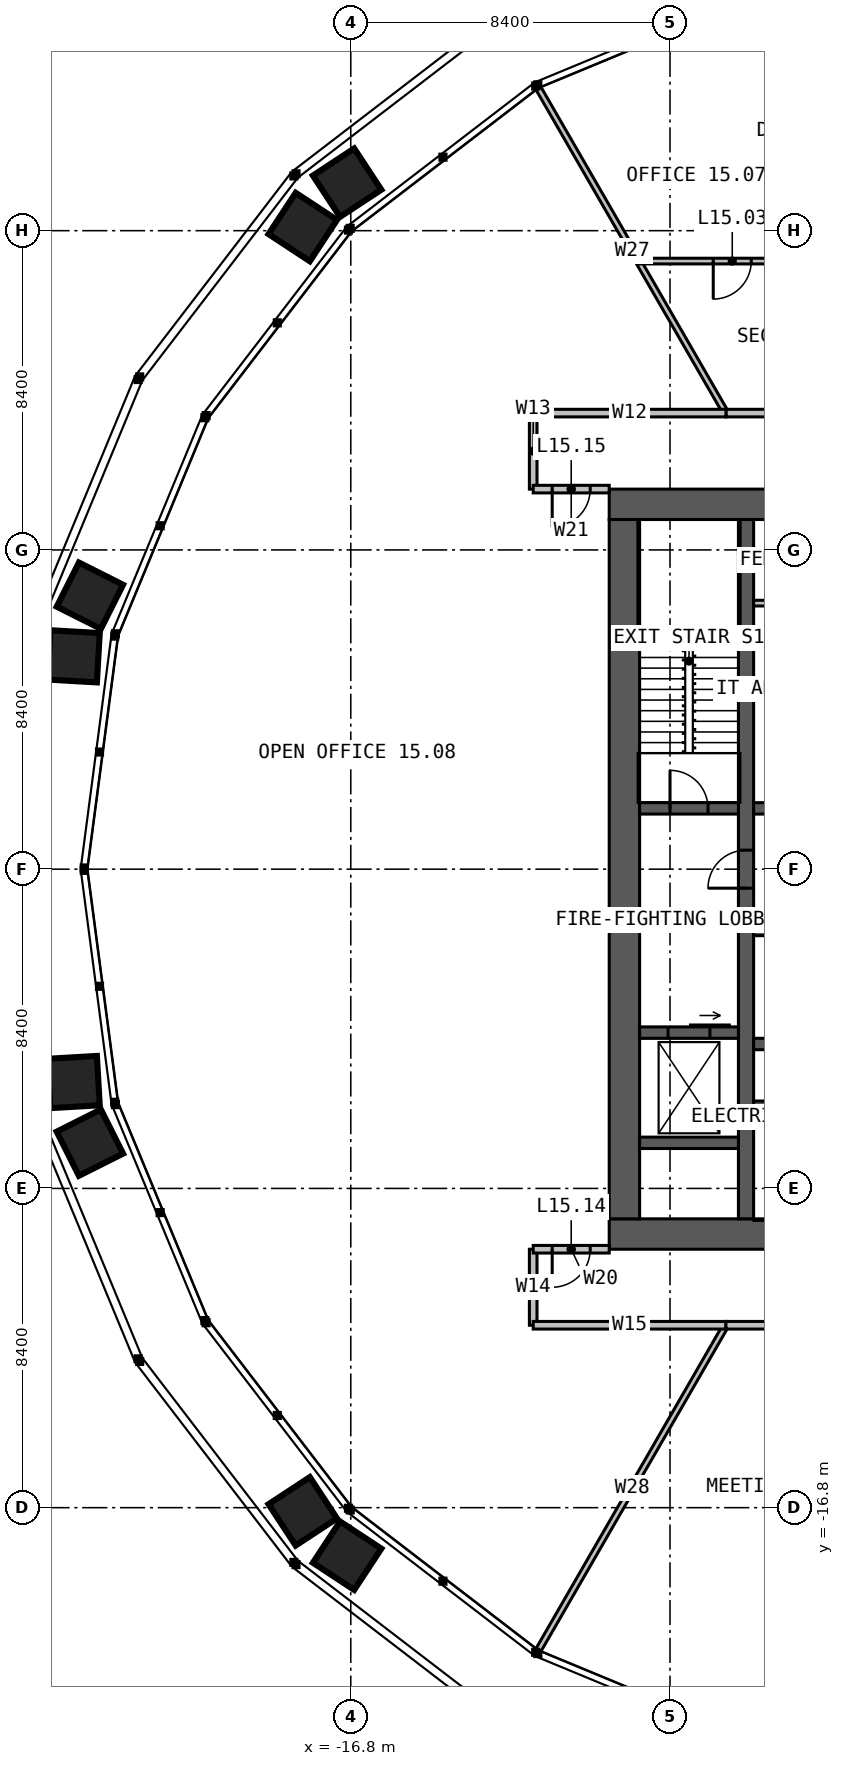
"""IFC4 building model, lengths in metres.
Left out: names, types, materials, properties, quantities, classifications, styles, units other than length and angle.
Written with IfcOpenShell. Run it as: python <this file> out.ifc"""

import sys

from ifc_helpers import new_model, si_unit, direction, frame, frame_2d, origin, place, context, subcontext, project, spatial, rectangle, extrude, element, fill, save


model = new_model("IFC4")
c1 = context("Model", 3, precision=1e-05, world=origin(), true_north=direction((0.0, 1.0)))
c2 = subcontext(c1, "Body", "Model", "MODEL_VIEW")
j1 = project(units=[si_unit("LENGTHUNIT", "METRE"), si_unit("PLANEANGLEUNIT", "RADIAN")], contexts=[c1])
p1 = place(None, origin())
s1 = spatial("IfcSite", under=j1, at=p1, CompositionType="ELEMENT")
p2 = place(p1, origin())
s2 = spatial("IfcBuilding", under=s1, at=p2, CompositionType="ELEMENT")
p3 = place(p2, frame((0.0, 0.0, 65.0)))
s3 = spatial("IfcBuildingStorey", under=s2, at=p3, CompositionType="ELEMENT", Elevation=65.0)
p4 = place(p3, frame((-10.0, 9.6, 0.0), z_axis=(0.0, 0.0, 1.0), x_axis=(1.0, 0.0, 0.0)))
e1 = element("IfcWall", 1, at=p4, inside=s3, PredefinedType="SOLIDWALL", context=c2, shape_type="SweptSolid", body=[
    extrude(rectangle(XDim=20.0, YDim=0.8, at=frame_2d((10.0, 0.0))), origin(), (0.0, 0.0, 1.0), 4.0),
])
p5 = place(p4, frame((9.4, 0.0, 0.0)))
e2 = element("IfcOpeningElement", 2, at=p5, cuts=e1, PredefinedType="OPENING", context=c2, shape_type="SweptSolid", body=[
    extrude(rectangle(XDim=1.2, YDim=2.2, at=frame_2d((0.6, 1.1))), frame((0.0, 0.41, 0.0), z_axis=(0.0, -1.0, 0.0), x_axis=(1.0, 0.0, 0.0)), (0.0, 0.0, 1.0), 0.82),
])
p6 = place(p3, frame((10.0, -9.6, 0.0), z_axis=(0.0, 0.0, 1.0), x_axis=(-1.0, 0.0, 0.0)))
e3 = element("IfcWall", 3, at=p6, inside=s3, PredefinedType="SOLIDWALL", context=c2, shape_type="SweptSolid", body=[
    extrude(rectangle(XDim=20.0, YDim=0.8, at=frame_2d((10.0, 0.0))), origin(), (0.0, 0.0, 1.0), 4.0),
])
p7 = place(p6, frame((6.875, 0.0, 0.0)))
e4 = element("IfcOpeningElement", 4, at=p7, cuts=e3, PredefinedType="OPENING", context=c2, shape_type="SweptSolid", body=[
    extrude(rectangle(XDim=1.2, YDim=2.2, at=frame_2d((0.6, 1.1))), frame((0.0, 0.41, 0.0), z_axis=(0.0, -1.0, 0.0), x_axis=(1.0, 0.0, 0.0)), (0.0, 0.0, 1.0), 0.82),
])
p8 = place(p3, frame((-9.6, 9.2, 0.0), z_axis=(0.0, 0.0, 1.0), x_axis=(0.0, -1.0, 0.0)))
e5 = element("IfcWall", 5, at=p8, inside=s3, PredefinedType="SOLIDWALL", context=c2, shape_type="SweptSolid", body=[
    extrude(rectangle(XDim=18.4, YDim=0.8, at=frame_2d((9.2, 0.0))), origin(), (0.0, 0.0, 1.0), 4.0),
])
p9 = place(p3, frame((-6.4, -9.2, 0.0), z_axis=(0.0, 0.0, 1.0), x_axis=(0.0, 1.0, 0.0)))
e6 = element("IfcWall", 6, at=p9, inside=s3, PredefinedType="SOLIDWALL", context=c2, shape_type="SweptSolid", body=[
    extrude(rectangle(XDim=18.4, YDim=0.4, at=frame_2d((9.2, 0.0))), origin(), (0.0, 0.0, 1.0), 4.0),
])
p10 = place(p9, frame((8.7, 0.0, 0.0)))
e7 = element("IfcOpeningElement", 7, at=p10, cuts=e6, PredefinedType="OPENING", context=c2, shape_type="SweptSolid", body=[
    extrude(rectangle(XDim=1.0, YDim=2.2, at=frame_2d((0.5, 1.1))), frame((0.0, 0.21, 0.0), z_axis=(0.0, -1.0, 0.0), x_axis=(1.0, 0.0, 0.0)), (0.0, 0.0, 1.0), 0.42),
])
p11 = place(p3, frame((-6.2, 1.6, 0.0), z_axis=(0.0, 0.0, 1.0), x_axis=(1.0, 0.0, 0.0)))
e8 = element("IfcWall", 8, at=p11, inside=s3, PredefinedType="SOLIDWALL", context=c2, shape_type="SweptSolid", body=[
    extrude(rectangle(XDim=4.85, YDim=0.3, at=frame_2d((2.425, 0.0))), origin(), (0.0, 0.0, 1.0), 4.0),
])
p12 = place(p11, frame((0.625, 0.0, 0.0)))
e9 = element("IfcOpeningElement", 9, at=p12, cuts=e8, PredefinedType="OPENING", context=c2, shape_type="SweptSolid", body=[
    extrude(rectangle(XDim=1.1, YDim=2.2, at=frame_2d((0.55, 1.1))), frame((0.0, 0.16, 0.0), z_axis=(0.0, -1.0, 0.0), x_axis=(1.0, 0.0, 0.0)), (0.0, 0.0, 1.0), 0.32),
])
p13 = place(p11, frame((3.15, 0.0, 0.0)))
e10 = element("IfcOpeningElement", 10, at=p13, cuts=e8, PredefinedType="OPENING", context=c2, shape_type="SweptSolid", body=[
    extrude(rectangle(XDim=1.1, YDim=2.2, at=frame_2d((0.55, 1.1))), frame((0.0, 0.16, 0.0), z_axis=(0.0, -1.0, 0.0), x_axis=(1.0, 0.0, 0.0)), (0.0, 0.0, 1.0), 0.32),
])
p14 = place(p3, frame((-6.2, 4.6, 0.0), z_axis=(0.0, 0.0, 1.0), x_axis=(1.0, 0.0, 0.0)))
e11 = element("IfcWall", 11, at=p14, inside=s3, PredefinedType="SOLIDWALL", context=c2, shape_type="SweptSolid", body=[
    extrude(rectangle(XDim=4.85, YDim=0.3, at=frame_2d((2.425, 0.0))), origin(), (0.0, 0.0, 1.0), 4.0),
])
for number, where, z_axis, x_axis in (
    (12, (-6.2, -1.6, 0.0), (0.0, 0.0, 1.0), (1.0, 0.0, 0.0)),
    (13, (-6.2, -4.6, 0.0), (0.0, 0.0, 1.0), (1.0, 0.0, 0.0)),
):
    element("IfcWall", number, at=place(p3, frame(where, z_axis=z_axis, x_axis=x_axis)), inside=s3, PredefinedType="SOLIDWALL", context=c2, shape_type="SweptSolid", body=[
        extrude(rectangle(XDim=7.4, YDim=0.3, at=frame_2d((3.7, 0.0))), origin(), (0.0, 0.0, 1.0), 4.0),
    ])
p15 = place(p3, frame((-6.2, -6.2, 0.0), z_axis=(0.0, 0.0, 1.0), x_axis=(1.0, 0.0, 0.0)))
e14 = element("IfcWall", 14, at=p15, inside=s3, PredefinedType="SOLIDWALL", context=c2, shape_type="SweptSolid", body=[
    extrude(rectangle(XDim=7.4, YDim=0.2, at=frame_2d((3.7, 0.0))), origin(), (0.0, 0.0, 1.0), 4.0),
])
p16 = place(p3, frame((-9.2, 1.6, 0.0), z_axis=(0.0, 0.0, 1.0), x_axis=(1.0, 0.0, 0.0)))
e15 = element("IfcWall", 15, at=p16, inside=s3, PredefinedType="SOLIDWALL", context=c2, shape_type="SweptSolid", body=[
    extrude(rectangle(XDim=2.6, YDim=0.3, at=frame_2d((1.3, 0.0))), origin(), (0.0, 0.0, 1.0), 4.0),
])
p17 = place(p16, frame((0.8, 0.0, 0.0)))
e16 = element("IfcOpeningElement", 16, at=p17, cuts=e15, PredefinedType="OPENING", context=c2, shape_type="SweptSolid", body=[
    extrude(rectangle(XDim=1.0, YDim=2.2, at=frame_2d((0.5, 1.1))), frame((0.0, 0.16, 0.0), z_axis=(0.0, -1.0, 0.0), x_axis=(1.0, 0.0, 0.0)), (0.0, 0.0, 1.0), 0.32),
])
p18 = place(p3, frame((-9.2, -4.3, 0.0), z_axis=(0.0, 0.0, 1.0), x_axis=(1.0, 0.0, 0.0)))
e17 = element("IfcWall", 17, at=p18, inside=s3, PredefinedType="SOLIDWALL", context=c2, shape_type="SweptSolid", body=[
    extrude(rectangle(XDim=2.6, YDim=0.3, at=frame_2d((1.3, 0.0))), origin(), (0.0, 0.0, 1.0), 4.0),
])
p19 = place(p18, frame((0.75, 0.0, 0.0)))
e18 = element("IfcOpeningElement", 18, at=p19, cuts=e17, PredefinedType="OPENING", context=c2, shape_type="SweptSolid", body=[
    extrude(rectangle(XDim=1.1, YDim=2.2, at=frame_2d((0.55, 1.1))), frame((0.0, 0.16, 0.0), z_axis=(0.0, -1.0, 0.0), x_axis=(1.0, 0.0, 0.0)), (0.0, 0.0, 1.0), 0.32),
])
p20 = place(p3, frame((-9.2, -7.2, 0.0), z_axis=(0.0, 0.0, 1.0), x_axis=(1.0, 0.0, 0.0)))
e19 = element("IfcWall", 19, at=p20, inside=s3, PredefinedType="SOLIDWALL", context=c2, shape_type="SweptSolid", body=[
    extrude(rectangle(XDim=2.6, YDim=0.3, at=frame_2d((1.3, 0.0))), origin(), (0.0, 0.0, 1.0), 4.0),
])
p21 = place(p3, frame((-6.2, 7.0, 0.0), z_axis=(0.0, 0.0, 1.0), x_axis=(1.0, 0.0, 0.0)))
e20 = element("IfcWall", 20, at=p21, inside=s3, PredefinedType="PARTITIONING", context=c2, shape_type="SweptSolid", body=[
    extrude(rectangle(XDim=3.225, YDim=0.15, at=frame_2d((1.612, 0.0))), origin(), (0.0, 0.0, 1.0), 3.75),
])
for number, where, z_axis, x_axis in (
    (21, (-6.928, 12.0, 0.0), (0.0, 0.0, 1.0), (-0.5, 0.866, 0.0)),
    (22, (-6.928, -12.0, 0.0), (0.0, 0.0, 1.0), (-0.5, -0.866, 0.0)),
):
    element("IfcWall", number, at=place(p3, frame(where, z_axis=z_axis, x_axis=x_axis)), inside=s3, PredefinedType="PARTITIONING", context=c2, shape_type="SweptSolid", body=[
        extrude(rectangle(XDim=9.87, YDim=0.15, at=frame_2d((4.935, 0.0))), origin(), (0.0, 0.0, 1.0), 2.79),
    ])
p22 = place(p3, frame((0.0, 16.0, 0.0), z_axis=(0.0, 0.0, 1.0), x_axis=(-1.0, 0.0, 0.0)))
e23 = element("IfcWall", 23, at=p22, inside=s3, PredefinedType="PARTITIONING", context=c2, shape_type="SweptSolid", body=[
    extrude(rectangle(XDim=9.238, YDim=0.15, at=frame_2d((4.619, 0.0))), origin(), (0.0, 0.0, 1.0), 2.79),
])
p23 = place(p22, frame((1.644, 0.0, 0.0)))
e24 = element("IfcOpeningElement", 24, at=p23, cuts=e23, PredefinedType="OPENING", context=c2, shape_type="SweptSolid", body=[
    extrude(rectangle(XDim=1.0, YDim=2.2, at=frame_2d((0.5, 1.1))), frame((0.0, 0.085, 0.0), z_axis=(0.0, -1.0, 0.0), x_axis=(1.0, 0.0, 0.0)), (0.0, 0.0, 1.0), 0.17),
])
p24 = place(p22, frame((6.262, 0.0, 0.0)))
e25 = element("IfcOpeningElement", 25, at=p24, cuts=e23, PredefinedType="OPENING", context=c2, shape_type="SweptSolid", body=[
    extrude(rectangle(XDim=1.0, YDim=2.2, at=frame_2d((0.5, 1.1))), frame((0.0, 0.085, 0.0), z_axis=(0.0, -1.0, 0.0), x_axis=(1.0, 0.0, 0.0)), (0.0, 0.0, 1.0), 0.17),
])
p25 = place(p3, frame((-4.287, 16.0, 0.0), z_axis=(0.0, 0.0, 1.0), x_axis=(-0.258840025144, 0.96592020446, 0.0)))
e26 = element("IfcWall", 26, at=p25, inside=s3, PredefinedType="PARTITIONING", context=c2, shape_type="SweptSolid", body=[
    extrude(rectangle(XDim=7.162, YDim=0.15, at=frame_2d((3.581, 0.0))), origin(), (0.0, 0.0, 1.0), 2.79),
])
p26 = place(p3, frame((0.0, 12.0, 0.0), z_axis=(0.0, 0.0, 1.0), x_axis=(-1.0, 0.0, 0.0)))
e27 = element("IfcWall", 27, at=p26, inside=s3, PredefinedType="PARTITIONING", context=c2, shape_type="SweptSolid", body=[
    extrude(rectangle(XDim=6.928, YDim=0.2, at=frame_2d((3.464, 0.0))), origin(), (0.0, 0.0, 1.0), 3.8),
])
p27 = place(p26, frame((2.964, 0.0, 0.0)))
e28 = element("IfcOpeningElement", 28, at=p27, cuts=e27, PredefinedType="OPENING", context=c2, shape_type="SweptSolid", body=[
    extrude(rectangle(XDim=1.0, YDim=2.2, at=frame_2d((0.5, 1.1))), frame((0.0, 0.11, 0.0), z_axis=(0.0, -1.0, 0.0), x_axis=(1.0, 0.0, 0.0)), (0.0, 0.0, 1.0), 0.22),
])
p28 = place(p3, frame((-6.928, 12.0, 0.0), z_axis=(0.0, 0.0, 1.0), x_axis=(-1.0, 0.0, 0.0)))
e29 = element("IfcWall", 29, at=p28, inside=s3, PredefinedType="PARTITIONING", context=c2, shape_type="SweptSolid", body=[
    extrude(rectangle(XDim=5.072, YDim=0.2, at=frame_2d((2.536, 0.0))), origin(), (0.0, 0.0, 1.0), 3.8),
])
for number, where, z_axis, x_axis in (
    (30, (-12.0, 12.0, 0.0), (0.0, 0.0, 1.0), (0.0, -1.0, 0.0)),
    (31, (-12.0, -10.0, 0.0), (0.0, 0.0, 1.0), (0.0, -1.0, 0.0)),
):
    element("IfcWall", number, at=place(p3, frame(where, z_axis=z_axis, x_axis=x_axis)), inside=s3, PredefinedType="PARTITIONING", context=c2, shape_type="SweptSolid", body=[
        extrude(rectangle(XDim=2.0, YDim=0.2, at=frame_2d((1.0, 0.0))), origin(), (0.0, 0.0, 1.0), 3.8),
    ])
p29 = place(p3, frame((-12.0, -12.0, 0.0), z_axis=(0.0, 0.0, 1.0), x_axis=(1.0, 0.0, 0.0)))
e32 = element("IfcWall", 32, at=p29, inside=s3, PredefinedType="PARTITIONING", context=c2, shape_type="SweptSolid", body=[
    extrude(rectangle(XDim=5.072, YDim=0.2, at=frame_2d((2.536, 0.0))), origin(), (0.0, 0.0, 1.0), 3.8),
])
p30 = place(p3, frame((-6.928, -12.0, 0.0), z_axis=(0.0, 0.0, 1.0), x_axis=(1.0, 0.0, 0.0)))
e33 = element("IfcWall", 33, at=p30, inside=s3, PredefinedType="PARTITIONING", context=c2, shape_type="SweptSolid", body=[
    extrude(rectangle(XDim=6.928, YDim=0.2, at=frame_2d((3.464, 0.0))), origin(), (0.0, 0.0, 1.0), 3.8),
])
p31 = place(p30, frame((2.964, 0.0, 0.0)))
e34 = element("IfcOpeningElement", 34, at=p31, cuts=e33, PredefinedType="OPENING", context=c2, shape_type="SweptSolid", body=[
    extrude(rectangle(XDim=1.0, YDim=2.2, at=frame_2d((0.5, 1.1))), frame((0.0, 0.11, 0.0), z_axis=(0.0, -1.0, 0.0), x_axis=(1.0, 0.0, 0.0)), (0.0, 0.0, 1.0), 0.22),
])
p32 = place(p3, frame((-10.0, -10.0, 0.0), z_axis=(0.0, 0.0, 1.0), x_axis=(-1.0, 0.0, 0.0)))
e35 = element("IfcWall", 35, at=p32, inside=s3, PredefinedType="PARTITIONING", context=c2, shape_type="SweptSolid", body=[
    extrude(rectangle(XDim=2.0, YDim=0.2, at=frame_2d((1.0, 0.0))), origin(), (0.0, 0.0, 1.0), 3.8),
])
p33 = place(p32, frame((0.5, 0.0, 0.0)))
e36 = element("IfcOpeningElement", 36, at=p33, cuts=e35, PredefinedType="OPENING", context=c2, shape_type="SweptSolid", body=[
    extrude(rectangle(XDim=1.0, YDim=2.2, at=frame_2d((0.5, 1.1))), frame((0.0, 0.11, 0.0), z_axis=(0.0, -1.0, 0.0), x_axis=(1.0, 0.0, 0.0)), (0.0, 0.0, 1.0), 0.22),
])
p34 = place(p3, frame((-10.0, 10.0, 0.0), z_axis=(0.0, 0.0, 1.0), x_axis=(-1.0, 0.0, 0.0)))
e37 = element("IfcWall", 37, at=p34, inside=s3, PredefinedType="PARTITIONING", context=c2, shape_type="SweptSolid", body=[
    extrude(rectangle(XDim=2.0, YDim=0.2, at=frame_2d((1.0, 0.0))), origin(), (0.0, 0.0, 1.0), 3.8),
])
p35 = place(p34, frame((0.5, 0.0, 0.0)))
e38 = element("IfcOpeningElement", 38, at=p35, cuts=e37, PredefinedType="OPENING", context=c2, shape_type="SweptSolid", body=[
    extrude(rectangle(XDim=1.0, YDim=2.2, at=frame_2d((0.5, 1.1))), frame((0.0, 0.11, 0.0), z_axis=(0.0, -1.0, 0.0), x_axis=(1.0, 0.0, 0.0)), (0.0, 0.0, 1.0), 0.22),
])
p36 = place(p10, origin())
e39 = element("IfcDoor", 39, at=p36, inside=s3, OperationType="SINGLE_SWING_LEFT", PredefinedType="DOOR", context=c2, shape_type="SweptSolid", body=[
    extrude(rectangle(XDim=1.0, YDim=2.2, at=frame_2d((0.5, 1.1))), frame((0.0, 0.025, 0.0), z_axis=(0.0, -1.0, 0.0), x_axis=(1.0, 0.0, 0.0)), (0.0, 0.0, 1.0), 0.05),
])
fill(e7, e39)
p37 = place(p17, origin())
e40 = element("IfcDoor", 40, at=p37, inside=s3, OperationType="SINGLE_SWING_LEFT", PredefinedType="DOOR", context=c2, shape_type="SweptSolid", body=[
    extrude(rectangle(XDim=1.0, YDim=2.2, at=frame_2d((0.5, 1.1))), frame((0.0, 0.025, 0.0), z_axis=(0.0, -1.0, 0.0), x_axis=(1.0, 0.0, 0.0)), (0.0, 0.0, 1.0), 0.05),
])
fill(e16, e40)
p38 = place(p19, origin())
e41 = element("IfcDoor", 41, at=p38, inside=s3, OperationType="SLIDING_TO_LEFT", PredefinedType="DOOR", context=c2, shape_type="SweptSolid", body=[
    extrude(rectangle(XDim=1.1, YDim=2.2, at=frame_2d((0.55, 1.1))), frame((0.0, 0.025, 0.0), z_axis=(0.0, -1.0, 0.0), x_axis=(1.0, 0.0, 0.0)), (0.0, 0.0, 1.0), 0.05),
])
fill(e18, e41)
p39 = place(p24, origin())
e42 = element("IfcDoor", 42, at=p39, inside=s3, OperationType="SINGLE_SWING_RIGHT", PredefinedType="DOOR", context=c2, shape_type="SweptSolid", body=[
    extrude(rectangle(XDim=1.0, YDim=2.2, at=frame_2d((0.5, 1.1))), frame((0.0, 0.025, 0.0), z_axis=(0.0, -1.0, 0.0), x_axis=(1.0, 0.0, 0.0)), (0.0, 0.0, 1.0), 0.05),
])
fill(e25, e42)
p40 = place(p33, origin())
e43 = element("IfcDoor", 43, at=p40, inside=s3, OperationType="SINGLE_SWING_RIGHT", PredefinedType="DOOR", context=c2, shape_type="SweptSolid", body=[
    extrude(rectangle(XDim=1.0, YDim=2.2, at=frame_2d((0.5, 1.1))), frame((0.0, 0.025, 0.0), z_axis=(0.0, -1.0, 0.0), x_axis=(1.0, 0.0, 0.0)), (0.0, 0.0, 1.0), 0.05),
])
fill(e36, e43)
p41 = place(p35, origin())
e44 = element("IfcDoor", 44, at=p41, inside=s3, OperationType="SINGLE_SWING_RIGHT", PredefinedType="DOOR", context=c2, shape_type="SweptSolid", body=[
    extrude(rectangle(XDim=1.0, YDim=2.2, at=frame_2d((0.5, 1.1))), frame((0.0, 0.025, 0.0), z_axis=(0.0, -1.0, 0.0), x_axis=(1.0, 0.0, 0.0)), (0.0, 0.0, 1.0), 0.05),
])
fill(e38, e44)
save(model, sys.argv[1])
